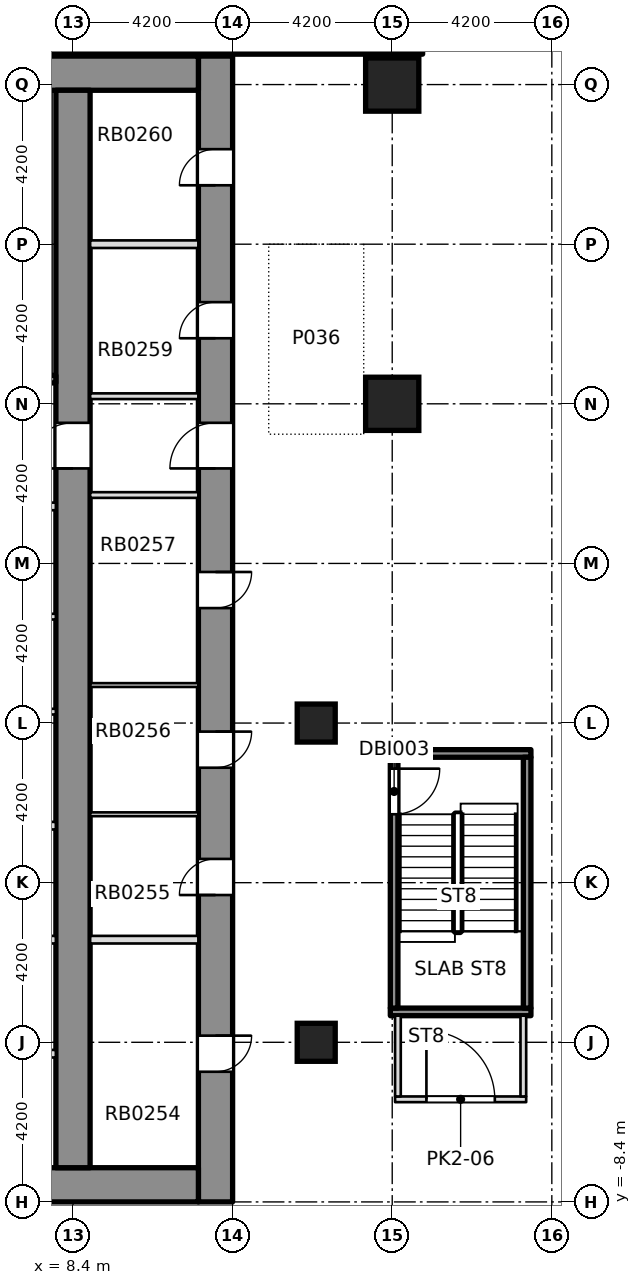
"""IFC4 building model, lengths in metres.
Left out: names, types, materials, properties, quantities, classifications, styles, units other than length and angle.
Written with IfcOpenShell. Run it as: python <this file> out.ifc"""

import sys

from ifc_helpers import new_model, si_unit, direction, frame, frame_2d, origin, origin_2d, place, context, subcontext, project, spatial, polyline, rectangle, outline, extrude, element, fill, save


model = new_model("IFC4")
c1 = context("Model", 3, precision=1e-05, world=origin(), true_north=direction((0.0, 1.0)))
c2 = subcontext(c1, "Body", "Model", "MODEL_VIEW")
j1 = project(units=[si_unit("LENGTHUNIT", "METRE"), si_unit("PLANEANGLEUNIT", "RADIAN")], contexts=[c1])
p1 = place(None, origin())
s1 = spatial("IfcSite", under=j1, at=p1, CompositionType="ELEMENT")
p2 = place(p1, origin())
s2 = spatial("IfcBuilding", under=s1, at=p2, CompositionType="ELEMENT")
p3 = place(p2, frame((0.0, 0.0, -8.4)))
s3 = spatial("IfcBuildingStorey", under=s2, at=p3, CompositionType="ELEMENT", Elevation=-8.4)
p4 = place(p3, frame((12.15, -8.4, 0.0), z_axis=(0.0, 0.0, 1.0), x_axis=(0.0, 1.0, 0.0)))
e1 = element("IfcWall", 1, at=p4, inside=s3, PredefinedType="SHEAR", context=c2, shape_type="SweptSolid", body=[
    extrude(rectangle(XDim=30.15, YDim=0.9, at=frame_2d((15.075, 0.0))), origin(), (0.0, 0.0, 1.0), 3.85),
])
p5 = place(p4, frame((3.425, 0.0, 0.0)))
e2 = element("IfcOpeningElement", 2, at=p5, cuts=e1, PredefinedType="OPENING", context=c2, shape_type="SweptSolid", body=[
    extrude(rectangle(XDim=0.95, YDim=2.1, at=frame_2d((0.475, 1.05))), frame((0.0, 0.46, 0.0), z_axis=(0.0, -1.0, 0.0), x_axis=(1.0, 0.0, 0.0)), (0.0, 0.0, 1.0), 0.92),
])
p6 = place(p4, frame((8.075, 0.0, 0.0)))
e3 = element("IfcOpeningElement", 3, at=p6, cuts=e1, PredefinedType="OPENING", context=c2, shape_type="SweptSolid", body=[
    extrude(rectangle(XDim=0.95, YDim=2.1, at=frame_2d((0.475, 1.05))), frame((0.0, 0.46, 0.0), z_axis=(0.0, -1.0, 0.0), x_axis=(1.0, 0.0, 0.0)), (0.0, 0.0, 1.0), 0.92),
])
p7 = place(p4, frame((11.425, 0.0, 0.0)))
e4 = element("IfcOpeningElement", 4, at=p7, cuts=e1, PredefinedType="OPENING", context=c2, shape_type="SweptSolid", body=[
    extrude(rectangle(XDim=0.95, YDim=2.1, at=frame_2d((0.475, 1.05))), frame((0.0, 0.46, 0.0), z_axis=(0.0, -1.0, 0.0), x_axis=(1.0, 0.0, 0.0)), (0.0, 0.0, 1.0), 0.92),
])
p8 = place(p4, frame((15.625, 0.0, 0.0)))
e5 = element("IfcOpeningElement", 5, at=p8, cuts=e1, PredefinedType="OPENING", context=c2, shape_type="SweptSolid", body=[
    extrude(rectangle(XDim=0.95, YDim=2.1, at=frame_2d((0.475, 1.05))), frame((0.0, 0.46, 0.0), z_axis=(0.0, -1.0, 0.0), x_axis=(1.0, 0.0, 0.0)), (0.0, 0.0, 1.0), 0.92),
])
p9 = place(p4, frame((22.725, 0.0, 0.0)))
e6 = element("IfcOpeningElement", 6, at=p9, cuts=e1, PredefinedType="OPENING", context=c2, shape_type="SweptSolid", body=[
    extrude(rectangle(XDim=0.95, YDim=2.1, at=frame_2d((0.475, 1.05))), frame((0.0, 0.46, 0.0), z_axis=(0.0, -1.0, 0.0), x_axis=(1.0, 0.0, 0.0)), (0.0, 0.0, 1.0), 0.92),
])
p10 = place(p4, frame((26.75, 0.0, 0.0)))
e7 = element("IfcOpeningElement", 7, at=p10, cuts=e1, PredefinedType="OPENING", context=c2, shape_type="SweptSolid", body=[
    extrude(rectangle(XDim=0.95, YDim=2.1, at=frame_2d((0.475, 1.05))), frame((0.0, 0.46, 0.0), z_axis=(0.0, -1.0, 0.0), x_axis=(1.0, 0.0, 0.0)), (0.0, 0.0, 1.0), 0.92),
])
p11 = place(p4, frame((19.3, 0.0, 0.0)))
e8 = element("IfcOpeningElement", 8, at=p11, cuts=e1, PredefinedType="OPENING", context=c2, shape_type="SweptSolid", body=[
    extrude(rectangle(XDim=1.2, YDim=2.1, at=frame_2d((0.6, 1.05))), frame((0.0, 0.46, 0.0), z_axis=(0.0, -1.0, 0.0), x_axis=(1.0, 0.0, 0.0)), (0.0, 0.0, 1.0), 0.92),
])
p12 = place(p3, frame((-11.7, -7.95, 0.0), z_axis=(0.0, 0.0, 1.0), x_axis=(1.0, 0.0, 0.0)))
e9 = element("IfcWall", 9, at=p12, inside=s3, PredefinedType="SHEAR", context=c2, shape_type="SweptSolid", body=[
    extrude(rectangle(XDim=23.4, YDim=0.9, at=frame_2d((11.7, 0.0))), origin(), (0.0, 0.0, 1.0), 3.85),
])
p13 = place(p12, frame((6.95, 0.0, 0.0)))
e10 = element("IfcOpeningElement", 10, at=p13, cuts=e9, PredefinedType="OPENING", context=c2, shape_type="SweptSolid", body=[
    extrude(rectangle(XDim=1.8, YDim=2.1, at=frame_2d((0.9, 1.05))), frame((0.0, 0.46, 0.0), z_axis=(0.0, -1.0, 0.0), x_axis=(1.0, 0.0, 0.0)), (0.0, 0.0, 1.0), 0.92),
])
p14 = place(p12, frame((14.65, 0.0, 0.0)))
e11 = element("IfcOpeningElement", 11, at=p14, cuts=e9, PredefinedType="OPENING", context=c2, shape_type="SweptSolid", body=[
    extrude(rectangle(XDim=1.8, YDim=2.1, at=frame_2d((0.9, 1.05))), frame((0.0, 0.46, 0.0), z_axis=(0.0, -1.0, 0.0), x_axis=(1.0, 0.0, 0.0)), (0.0, 0.0, 1.0), 0.92),
])
p15 = place(p3, frame((-11.7, 21.3, 0.0), z_axis=(0.0, 0.0, 1.0), x_axis=(1.0, 0.0, 0.0)))
e12 = element("IfcWall", 12, at=p15, inside=s3, PredefinedType="SOLIDWALL", context=c2, shape_type="SweptSolid", body=[
    extrude(rectangle(XDim=23.4, YDim=0.9, at=frame_2d((11.7, 0.0))), origin(), (0.0, 0.0, 1.0), 3.85),
])
p16 = place(p3, frame((8.4, -7.5, 0.0), z_axis=(0.0, 0.0, 1.0), x_axis=(0.0, 1.0, 0.0)))
e13 = element("IfcWall", 13, at=p16, inside=s3, PredefinedType="SHEAR", context=c2, shape_type="SweptSolid", body=[
    extrude(rectangle(XDim=28.35, YDim=0.9, at=frame_2d((14.175, 0.0))), origin(), (0.0, 0.0, 1.0), 3.85),
])
p17 = place(p16, frame((18.4, 0.0, 0.0)))
e14 = element("IfcOpeningElement", 14, at=p17, cuts=e13, PredefinedType="OPENING", context=c2, shape_type="SweptSolid", body=[
    extrude(rectangle(XDim=1.2, YDim=2.1, at=frame_2d((0.6, 1.05))), frame((0.0, 0.46, 0.0), z_axis=(0.0, -1.0, 0.0), x_axis=(1.0, 0.0, 0.0)), (0.0, 0.0, 1.0), 0.92),
])
for number, where, z_axis, x_axis in (
    (15, (16.8, 12.6, 0.0), (0.0, 0.0, 1.0), (1.0, 0.0, 0.0)),
    (16, (16.8, 21.0, 0.0), (0.0, 0.0, 1.0), (1.0, 0.0, 0.0)),
):
    element("IfcColumn", number, at=place(p3, frame(where, z_axis=z_axis, x_axis=x_axis)), inside=s3, PredefinedType="COLUMN", context=c2, shape_type="SweptSolid", body=[
        extrude(rectangle(XDim=1.4, YDim=1.4, at=origin_2d()), origin(), (0.0, 0.0, 1.0), 3.85),
    ])
for number, where, z_axis, x_axis in (
    (17, (14.8, -4.2, 0.0), (0.0, 0.0, 1.0), (1.0, 0.0, 0.0)),
    (18, (14.8, 4.2, 0.0), (0.0, 0.0, 1.0), (1.0, 0.0, 0.0)),
):
    element("IfcColumn", number, at=place(p3, frame(where, z_axis=z_axis, x_axis=x_axis)), inside=s3, PredefinedType="COLUMN", context=c2, shape_type="SweptSolid", body=[
        extrude(rectangle(XDim=1.0, YDim=1.0, at=origin_2d()), origin(), (0.0, 0.0, 1.0), 3.85),
    ])
p18 = place(p3, frame((16.875, -5.7, 0.0), z_axis=(0.0, 0.0, 1.0), x_axis=(1.0, 0.0, 0.0)))
e19 = element("IfcWall", 19, at=p18, inside=s3, PredefinedType="PARTITIONING", context=c2, shape_type="SweptSolid", body=[
    extrude(rectangle(XDim=3.45, YDim=0.15, at=frame_2d((1.725, 0.0))), origin(), (0.0, 0.0, 1.0), 3.85),
])
p19 = place(p18, frame((0.825, 0.0, 0.0)))
e20 = element("IfcOpeningElement", 20, at=p19, cuts=e19, PredefinedType="OPENING", context=c2, shape_type="SweptSolid", body=[
    extrude(rectangle(XDim=1.8, YDim=2.1, at=frame_2d((0.9, 1.05))), frame((0.0, 0.085, 0.0), z_axis=(0.0, -1.0, 0.0), x_axis=(1.0, 0.0, 0.0)), (0.0, 0.0, 1.0), 0.17),
])
for number, where, z_axis, x_axis in (
    (21, (16.95, -5.625, 0.0), (0.0, 0.0, 1.0), (0.0, 1.0, 0.0)),
    (22, (20.25, -5.625, 0.0), (0.0, 0.0, 1.0), (0.0, 1.0, 0.0)),
):
    element("IfcWall", number, at=place(p3, frame(where, z_axis=z_axis, x_axis=x_axis)), inside=s3, PredefinedType="PARTITIONING", context=c2, shape_type="SweptSolid", body=[
        extrude(rectangle(XDim=2.125, YDim=0.15, at=frame_2d((1.062, 0.0))), origin(), (0.0, 0.0, 1.0), 3.85),
    ])
p20 = place(p3, frame((-17.6, 22.0, 0.0), z_axis=(0.0, 0.0, 1.0), x_axis=(1.0, 0.0, 0.0)))
e23 = element("IfcWall", 23, at=p20, inside=s3, PredefinedType="SOLIDWALL", context=c2, shape_type="SweptSolid", body=[
    extrude(outline(polyline([(0.0, 0.0), (35.2, 0.0), (35.2, 3.9), (34.6, 3.899), (32.2, 3.702), (3.0, -0.105), (0.0, -0.301), (0.0, 0.0)])), frame((0.0, 0.2, 0.0), z_axis=(0.0, -1.0, 0.0), x_axis=(1.0, 0.0, 0.0)), (0.0, 0.0, 1.0), 0.4),
])
for number, where, z_axis, x_axis in (
    (24, (5.575, -4.5, 0.0), (0.0, 0.0, 1.0), (1.0, 0.0, 0.0)),
    (25, (5.575, -1.5, 0.0), (0.0, 0.0, 1.0), (1.0, 0.0, 0.0)),
    (26, (5.575, 1.5, 0.0), (0.0, 0.0, 1.0), (1.0, 0.0, 0.0)),
):
    element("IfcWall", number, at=place(p3, frame(where, z_axis=z_axis, x_axis=x_axis)), inside=s3, PredefinedType="PARTITIONING", context=c2, shape_type="SweptSolid", body=[
        extrude(rectangle(XDim=2.374, YDim=0.2, at=frame_2d((1.187, 0.0))), origin(), (0.0, 0.0, 1.0), 3.85),
    ])
p21 = place(p3, frame((5.425, 4.5, 0.0), z_axis=(0.0, 0.0, 1.0), x_axis=(1.0, 0.0, 0.0)))
e27 = element("IfcWall", 27, at=p21, inside=s3, PredefinedType="PARTITIONING", context=c2, shape_type="SweptSolid", body=[
    extrude(rectangle(XDim=2.524, YDim=0.15, at=frame_2d((1.262, 0.0))), origin(), (0.0, 0.0, 1.0), 3.85),
])
p22 = place(p3, frame((-7.949, 7.0, 0.0), z_axis=(0.0, 0.0, 1.0), x_axis=(1.0, 0.0, 0.0)))
e28 = element("IfcWall", 28, at=p22, inside=s3, PredefinedType="PARTITIONING", context=c2, shape_type="SweptSolid", body=[
    extrude(rectangle(XDim=15.898, YDim=0.15, at=frame_2d((7.949, 0.0))), origin(), (0.0, 0.0, 1.0), 3.85),
])
p23 = place(p22, frame((7.249, 0.0, 0.0)))
e29 = element("IfcOpeningElement", 29, at=p23, cuts=e28, PredefinedType="OPENING", context=c2, shape_type="SweptSolid", body=[
    extrude(rectangle(XDim=1.4, YDim=2.1, at=frame_2d((0.7, 1.05))), frame((0.0, 0.085, 0.0), z_axis=(0.0, -1.0, 0.0), x_axis=(1.0, 0.0, 0.0)), (0.0, 0.0, 1.0), 0.17),
])
p24 = place(p3, frame((3.6, 9.9, 0.0), z_axis=(0.0, 0.0, 1.0), x_axis=(1.0, 0.0, 0.0)))
e30 = element("IfcWall", 30, at=p24, inside=s3, PredefinedType="PARTITIONING", context=c2, shape_type="SweptSolid", body=[
    extrude(rectangle(XDim=4.349, YDim=0.2, at=frame_2d((2.174, 0.0))), origin(), (0.0, 0.0, 1.0), 3.85),
])
p25 = place(p24, frame((2.25, 0.0, 0.0)))
e31 = element("IfcOpeningElement", 31, at=p25, cuts=e30, PredefinedType="OPENING", context=c2, shape_type="SweptSolid", body=[
    extrude(rectangle(XDim=1.1, YDim=2.1, at=frame_2d((0.55, 1.05))), frame((0.0, 0.11, 0.0), z_axis=(0.0, -1.0, 0.0), x_axis=(1.0, 0.0, 0.0)), (0.0, 0.0, 1.0), 0.22),
])
p26 = place(p3, frame((3.425, 13.25, 0.0), z_axis=(0.0, 0.0, 1.0), x_axis=(1.0, 0.0, 0.0)))
e32 = element("IfcWall", 32, at=p26, inside=s3, PredefinedType="SOLIDWALL", context=c2, shape_type="SweptSolid", body=[
    extrude(rectangle(XDim=4.524, YDim=0.2, at=frame_2d((2.262, 0.0))), origin(), (0.0, 0.0, 1.0), 3.85),
])
p27 = place(p26, frame((1.825, 0.0, 0.0)))
e33 = element("IfcOpeningElement", 33, at=p27, cuts=e32, PredefinedType="OPENING", context=c2, shape_type="SweptSolid", body=[
    extrude(rectangle(XDim=1.2, YDim=2.1, at=frame_2d((0.6, 1.05))), frame((0.0, 0.11, 0.0), z_axis=(0.0, -1.0, 0.0), x_axis=(1.0, 0.0, 0.0)), (0.0, 0.0, 1.0), 0.22),
])
p28 = place(p3, frame((8.851, -1.5, 0.0), z_axis=(0.0, 0.0, 1.0), x_axis=(1.0, 0.0, 0.0)))
e34 = element("IfcWall", 34, at=p28, inside=s3, PredefinedType="PARTITIONING", context=c2, shape_type="SweptSolid", body=[
    extrude(rectangle(XDim=2.848, YDim=0.2, at=frame_2d((1.424, 0.0))), origin(), (0.0, 0.0, 1.0), 3.85),
])
for number, where, z_axis, x_axis in (
    (35, (8.851, 1.8, 0.0), (0.0, 0.0, 1.0), (1.0, 0.0, 0.0)),
    (36, (8.851, 5.2, 0.0), (0.0, 0.0, 1.0), (1.0, 0.0, 0.0)),
):
    element("IfcWall", number, at=place(p3, frame(where, z_axis=z_axis, x_axis=x_axis)), inside=s3, PredefinedType="PARTITIONING", context=c2, shape_type="SweptSolid", body=[
        extrude(rectangle(XDim=2.848, YDim=0.1, at=frame_2d((1.424, 0.0))), origin(), (0.0, 0.0, 1.0), 3.85),
    ])
for number, where, z_axis, x_axis in (
    (37, (8.851, 10.2, 0.0), (0.0, 0.0, 1.0), (1.0, 0.0, 0.0)),
    (38, (8.851, 12.8, 0.0), (0.0, 0.0, 1.0), (1.0, 0.0, 0.0)),
):
    element("IfcWall", number, at=place(p3, frame(where, z_axis=z_axis, x_axis=x_axis)), inside=s3, PredefinedType="PARTITIONING", context=c2, shape_type="SweptSolid", body=[
        extrude(rectangle(XDim=2.848, YDim=0.15, at=frame_2d((1.424, 0.0))), origin(), (0.0, 0.0, 1.0), 3.85),
    ])
p29 = place(p3, frame((8.851, 16.8, 0.0), z_axis=(0.0, 0.0, 1.0), x_axis=(1.0, 0.0, 0.0)))
e39 = element("IfcWall", 39, at=p29, inside=s3, PredefinedType="PARTITIONING", context=c2, shape_type="SweptSolid", body=[
    extrude(rectangle(XDim=2.848, YDim=0.2, at=frame_2d((1.424, 0.0))), origin(), (0.0, 0.0, 1.0), 3.85),
])
for number, where, z_axis, x_axis in (
    (40, (16.75, -3.4, 0.0), (0.0, 0.0, 1.0), (1.0, 0.0, 0.0)),
    (41, (16.75, 3.4, 0.0), (0.0, 0.0, 1.0), (1.0, 0.0, 0.0)),
):
    element("IfcWall", number, at=place(p3, frame(where, z_axis=z_axis, x_axis=x_axis)), inside=s3, PredefinedType="SOLIDWALL", context=c2, shape_type="SweptSolid", body=[
        extrude(rectangle(XDim=3.7, YDim=0.2, at=frame_2d((1.85, 0.0))), origin(), (0.0, 0.0, 1.0), 3.85),
    ])
p30 = place(p3, frame((16.85, -3.3, 0.0), z_axis=(0.0, 0.0, 1.0), x_axis=(0.0, 1.0, 0.0)))
e42 = element("IfcWall", 42, at=p30, inside=s3, PredefinedType="SOLIDWALL", context=c2, shape_type="SweptSolid", body=[
    extrude(rectangle(XDim=6.6, YDim=0.2, at=frame_2d((3.3, 0.0))), origin(), (0.0, 0.0, 1.0), 3.85),
])
p31 = place(p30, frame((5.1, 0.0, 0.0)))
e43 = element("IfcOpeningElement", 43, at=p31, cuts=e42, PredefinedType="OPENING", context=c2, shape_type="SweptSolid", body=[
    extrude(rectangle(XDim=1.2, YDim=2.1, at=frame_2d((0.6, 1.05))), frame((0.0, 0.11, 0.0), z_axis=(0.0, -1.0, 0.0), x_axis=(1.0, 0.0, 0.0)), (0.0, 0.0, 1.0), 0.22),
])
p32 = place(p3, frame((20.35, -3.3, 0.0), z_axis=(0.0, 0.0, 1.0), x_axis=(0.0, 1.0, 0.0)))
e44 = element("IfcWall", 44, at=p32, inside=s3, PredefinedType="SOLIDWALL", context=c2, shape_type="SweptSolid", body=[
    extrude(rectangle(XDim=6.6, YDim=0.2, at=frame_2d((3.3, 0.0))), origin(), (0.0, 0.0, 1.0), 3.85),
])
p33 = place(p19, origin())
e45 = element("IfcDoor", 45, at=p33, inside=s3, OperationType="DOUBLE_DOOR_SINGLE_SWING", PredefinedType="DOOR", context=c2, shape_type="SweptSolid", body=[
    extrude(rectangle(XDim=1.8, YDim=2.1, at=frame_2d((0.9, 1.05))), frame((0.0, 0.025, 0.0), z_axis=(0.0, -1.0, 0.0), x_axis=(1.0, 0.0, 0.0)), (0.0, 0.0, 1.0), 0.05),
])
fill(e20, e45)
p34 = place(p5, origin())
e46 = element("IfcDoor", 46, at=p34, inside=s3, OperationType="SINGLE_SWING_LEFT", PredefinedType="DOOR", context=c2, shape_type="SweptSolid", body=[
    extrude(rectangle(XDim=0.95, YDim=2.1, at=frame_2d((0.475, 1.05))), frame((0.0, 0.025, 0.0), z_axis=(0.0, -1.0, 0.0), x_axis=(1.0, 0.0, 0.0)), (0.0, 0.0, 1.0), 0.05),
])
fill(e2, e46)
p35 = place(p6, origin())
e47 = element("IfcDoor", 47, at=p35, inside=s3, OperationType="SINGLE_SWING_LEFT", PredefinedType="DOOR", context=c2, shape_type="SweptSolid", body=[
    extrude(rectangle(XDim=0.95, YDim=2.1, at=frame_2d((0.475, 1.05))), frame((0.0, 0.025, 0.0), z_axis=(0.0, -1.0, 0.0), x_axis=(1.0, 0.0, 0.0)), (0.0, 0.0, 1.0), 0.05),
])
fill(e3, e47)
p36 = place(p7, origin())
e48 = element("IfcDoor", 48, at=p36, inside=s3, OperationType="SINGLE_SWING_LEFT", PredefinedType="DOOR", context=c2, shape_type="SweptSolid", body=[
    extrude(rectangle(XDim=0.95, YDim=2.1, at=frame_2d((0.475, 1.05))), frame((0.0, 0.025, 0.0), z_axis=(0.0, -1.0, 0.0), x_axis=(1.0, 0.0, 0.0)), (0.0, 0.0, 1.0), 0.05),
])
fill(e4, e48)
p37 = place(p8, origin())
e49 = element("IfcDoor", 49, at=p37, inside=s3, OperationType="SINGLE_SWING_LEFT", PredefinedType="DOOR", context=c2, shape_type="SweptSolid", body=[
    extrude(rectangle(XDim=0.95, YDim=2.1, at=frame_2d((0.475, 1.05))), frame((0.0, 0.025, 0.0), z_axis=(0.0, -1.0, 0.0), x_axis=(1.0, 0.0, 0.0)), (0.0, 0.0, 1.0), 0.05),
])
fill(e5, e49)
p38 = place(p9, origin())
e50 = element("IfcDoor", 50, at=p38, inside=s3, OperationType="SINGLE_SWING_LEFT", PredefinedType="DOOR", context=c2, shape_type="SweptSolid", body=[
    extrude(rectangle(XDim=0.95, YDim=2.1, at=frame_2d((0.475, 1.05))), frame((0.0, 0.025, 0.0), z_axis=(0.0, -1.0, 0.0), x_axis=(1.0, 0.0, 0.0)), (0.0, 0.0, 1.0), 0.05),
])
fill(e6, e50)
p39 = place(p10, origin())
e51 = element("IfcDoor", 51, at=p39, inside=s3, OperationType="SINGLE_SWING_LEFT", PredefinedType="DOOR", context=c2, shape_type="SweptSolid", body=[
    extrude(rectangle(XDim=0.95, YDim=2.1, at=frame_2d((0.475, 1.05))), frame((0.0, 0.025, 0.0), z_axis=(0.0, -1.0, 0.0), x_axis=(1.0, 0.0, 0.0)), (0.0, 0.0, 1.0), 0.05),
])
fill(e7, e51)
p40 = place(p11, origin())
e52 = element("IfcDoor", 52, at=p40, inside=s3, OperationType="SINGLE_SWING_LEFT", PredefinedType="DOOR", context=c2, shape_type="SweptSolid", body=[
    extrude(rectangle(XDim=1.2, YDim=2.1, at=frame_2d((0.6, 1.05))), frame((0.0, 0.025, 0.0), z_axis=(0.0, -1.0, 0.0), x_axis=(1.0, 0.0, 0.0)), (0.0, 0.0, 1.0), 0.05),
])
fill(e8, e52)
p41 = place(p17, origin())
e53 = element("IfcDoor", 53, at=p41, inside=s3, OperationType="SINGLE_SWING_LEFT", PredefinedType="DOOR", context=c2, shape_type="SweptSolid", body=[
    extrude(rectangle(XDim=1.2, YDim=2.1, at=frame_2d((0.6, 1.05))), frame((0.0, 0.025, 0.0), z_axis=(0.0, -1.0, 0.0), x_axis=(1.0, 0.0, 0.0)), (0.0, 0.0, 1.0), 0.05),
])
fill(e14, e53)
p42 = place(p31, origin())
e54 = element("IfcDoor", 54, at=p42, inside=s3, OperationType="SINGLE_SWING_LEFT", PredefinedType="DOOR", context=c2, shape_type="SweptSolid", body=[
    extrude(rectangle(XDim=1.2, YDim=2.1, at=frame_2d((0.6, 1.05))), frame((0.0, 0.025, 0.0), z_axis=(0.0, -1.0, 0.0), x_axis=(1.0, 0.0, 0.0)), (0.0, 0.0, 1.0), 0.05),
])
fill(e43, e54)
save(model, sys.argv[1])
